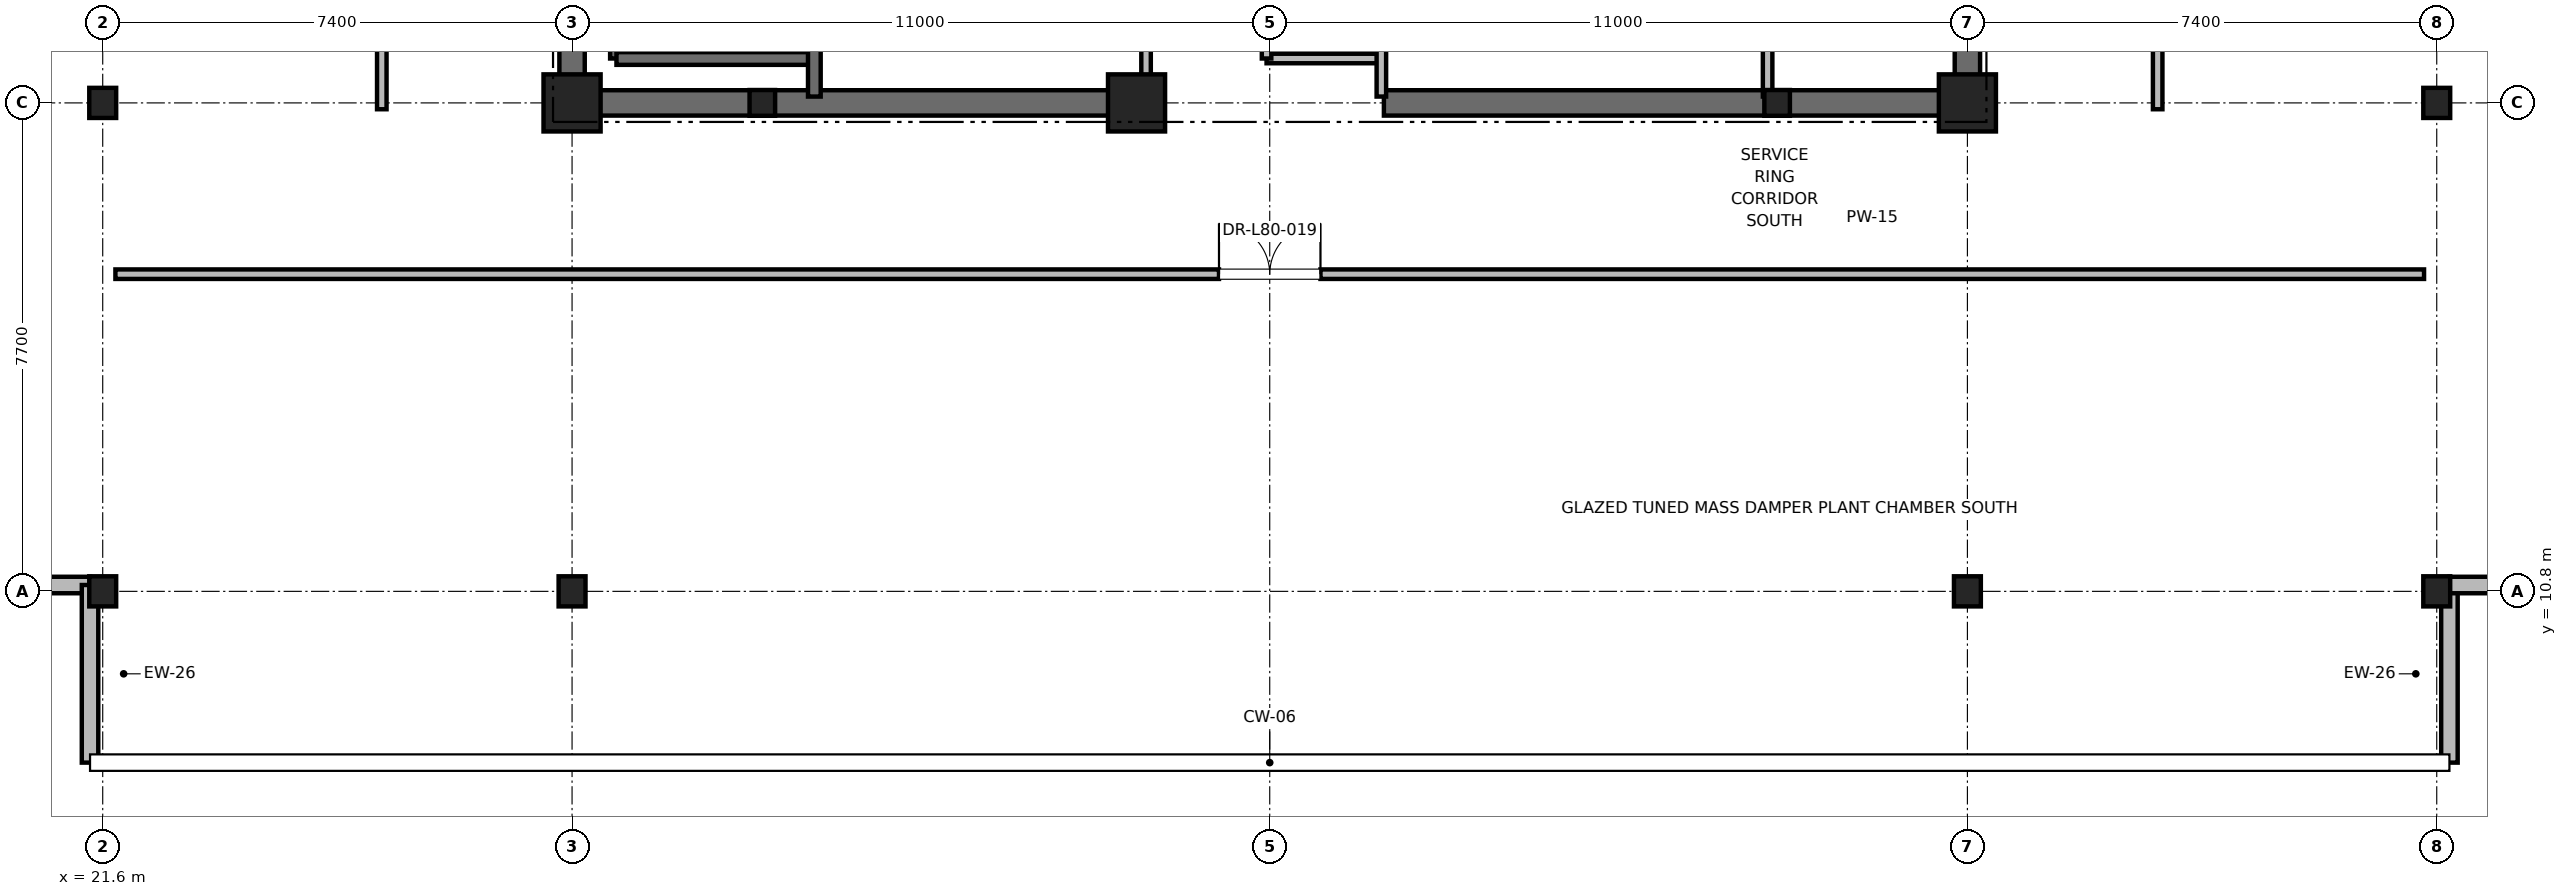
"""IFC4 building model, lengths in metres.
Left out: names, types, materials, properties, quantities, classifications, styles, units other than length and angle.
Written with IfcOpenShell. Run it as: python <this file> out.ifc"""

import sys

from ifc_helpers import new_model, si_unit, direction, frame, frame_2d, origin, origin_2d, place, context, subcontext, project, spatial, rectangle, i_section, extrude, element, fill, save


model = new_model("IFC4")
c1 = context("Model", 3, precision=1e-05, world=origin(), true_north=direction((0.0, 1.0)))
c2 = subcontext(c1, "Body", "Model", "MODEL_VIEW")
j1 = project(units=[si_unit("LENGTHUNIT", "METRE"), si_unit("PLANEANGLEUNIT", "RADIAN")], contexts=[c1])
p1 = place(None, origin())
s1 = spatial("IfcSite", under=j1, at=p1, CompositionType="ELEMENT")
p2 = place(p1, origin())
s2 = spatial("IfcBuilding", under=s1, at=p2, CompositionType="ELEMENT")
p3 = place(p2, frame((0.0, 0.0, 342.8)))
s3 = spatial("IfcBuildingStorey", under=s2, at=p3, CompositionType="ELEMENT", Elevation=342.8)
for number, where, z_axis, x_axis in (
    (1, (29.0, 10.8, 0.0), (0.0, 0.0, 1.0), (1.0, 0.0, 0.0)),
    (2, (51.0, 10.8, 0.0), (0.0, 0.0, 1.0), (1.0, 0.0, 0.0)),
    (3, (21.6, 18.5, 0.0), (0.0, 0.0, 1.0), (1.0, 0.0, 0.0)),
    (4, (58.4, 18.5, 0.0), (0.0, 0.0, 1.0), (1.0, 0.0, 0.0)),
    (5, (21.6, 10.8, 0.0), (0.0, 0.0, 1.0), (1.0, 0.0, 0.0)),
    (6, (58.4, 10.8, 0.0), (0.0, 0.0, 1.0), (1.0, 0.0, 0.0)),
):
    element("IfcColumn", number, at=place(p3, frame(where, z_axis=z_axis, x_axis=x_axis)), inside=s3, PredefinedType="COLUMN", context=c2, shape_type="SweptSolid", body=[
        extrude(i_section(OverallWidth=0.424, OverallDepth=0.475, WebThickness=0.048, FlangeThickness=0.077, FilletRadius=0.015, at=origin_2d()), origin(), (0.0, 0.0, 1.0), 6.0),
    ])
for number, where, z_axis, x_axis in (
    (7, (29.0, 18.5, 0.0), (0.0, 0.0, 1.0), (1.0, 0.0, 0.0)),
    (8, (51.0, 18.5, 0.0), (0.0, 0.0, 1.0), (1.0, 0.0, 0.0)),
    (9, (37.9, 18.5, 0.0), (0.0, 0.0, 1.0), (1.0, 0.0, 0.0)),
):
    element("IfcColumn", number, at=place(p3, frame(where, z_axis=z_axis, x_axis=x_axis)), inside=s3, PredefinedType="PILASTER", context=c2, shape_type="SweptSolid", body=[
        extrude(rectangle(XDim=0.9, YDim=0.9, at=origin_2d()), origin(), (0.0, 0.0, 1.0), 6.0),
    ])
for number, where, z_axis, x_axis in (
    (10, (32.0, 18.5, 0.0), (0.0, 0.0, 1.0), (1.0, 0.0, 0.0)),
    (11, (48.0, 18.5, 0.0), (0.0, 0.0, 1.0), (1.0, 0.0, 0.0)),
):
    element("IfcColumn", number, at=place(p3, frame(where, z_axis=z_axis, x_axis=x_axis)), inside=s3, PredefinedType="COLUMN", context=c2, shape_type="SweptSolid", body=[
        extrude(i_section(OverallWidth=0.403, OverallDepth=0.406, WebThickness=0.027, FlangeThickness=0.043, FilletRadius=0.015, at=origin_2d()), origin(), (0.0, 0.0, 1.0), 6.0),
    ])
for number, where, z_axis, x_axis in (
    (12, (29.0, 18.5, 0.0), (0.0, 0.0, 1.0), (1.0, 0.0, 0.0)),
    (13, (41.8, 18.5, 0.0), (0.0, 0.0, 1.0), (1.0, 0.0, 0.0)),
):
    element("IfcWall", number, at=place(p3, frame(where, z_axis=z_axis, x_axis=x_axis)), inside=s3, PredefinedType="SHEAR", context=c2, shape_type="SweptSolid", body=[
        extrude(rectangle(XDim=9.2, YDim=0.4, at=frame_2d((4.6, 0.0))), origin(), (0.0, 0.0, 1.0), 5.7),
    ])
p4 = place(p3, frame((29.0, 18.5, 0.0), z_axis=(0.0, 0.0, 1.0), x_axis=(0.0, 1.0, 0.0)))
e14 = element("IfcWall", 14, at=p4, inside=s3, PredefinedType="SHEAR", context=c2, shape_type="SweptSolid", body=[
    extrude(rectangle(XDim=8.8, YDim=0.4, at=frame_2d((4.4, 0.0))), origin(), (0.0, 0.0, 1.0), 5.7),
])
p5 = place(p3, frame((51.0, 18.5, 0.0), z_axis=(0.0, 0.0, 1.0), x_axis=(0.0, 1.0, 0.0)))
e15 = element("IfcWall", 15, at=p5, inside=s3, PredefinedType="SHEAR", context=c2, shape_type="SweptSolid", body=[
    extrude(rectangle(XDim=5.8, YDim=0.4, at=frame_2d((2.9, 0.0))), origin(), (0.0, 0.0, 1.0), 5.7),
])
p6 = place(p3, frame((18.2, 10.9, 0.0), z_axis=(0.0, 0.0, 1.0), x_axis=(1.0, 0.0, 0.0)))
e16 = element("IfcWall", 16, at=p6, inside=s3, PredefinedType="PARAPET", context=c2, shape_type="SweptSolid", body=[
    extrude(rectangle(XDim=3.2, YDim=0.26, at=frame_2d((1.6, 0.0))), origin(), (0.0, 0.0, 1.0), 4.753),
])
p7 = place(p6, frame((0.7, 0.0, 0.85)))
e17 = element("IfcOpeningElement", 17, at=p7, cuts=e16, PredefinedType="OPENING", context=c2, shape_type="SweptSolid", body=[
    extrude(rectangle(XDim=1.8, YDim=2.2, at=frame_2d((0.9, 1.1))), frame((0.0, 0.13, 0.0), z_axis=(0.0, -1.0, 0.0), x_axis=(1.0, 0.0, 0.0)), (0.0, 0.0, 1.0), 0.26),
])
for number, where, z_axis, x_axis in (
    (18, (21.4, 10.9, 0.0), (0.0, 0.0, 1.0), (0.0, -1.0, 0.0)),
    (19, (58.6, 8.1, 0.0), (0.0, 0.0, 1.0), (0.0, 1.0, 0.0)),
):
    element("IfcWall", number, at=place(p3, frame(where, z_axis=z_axis, x_axis=x_axis)), inside=s3, PredefinedType="PARAPET", context=c2, shape_type="SweptSolid", body=[
        extrude(rectangle(XDim=2.8, YDim=0.26, at=frame_2d((1.4, 0.0))), origin(), (0.0, 0.0, 1.0), 4.753),
    ])
p8 = place(p3, frame((58.6, 10.9, 0.0), z_axis=(0.0, 0.0, 1.0), x_axis=(1.0, 0.0, 0.0)))
e20 = element("IfcWall", 20, at=p8, inside=s3, PredefinedType="PARAPET", context=c2, shape_type="SweptSolid", body=[
    extrude(rectangle(XDim=3.2, YDim=0.26, at=frame_2d((1.6, 0.0))), origin(), (0.0, 0.0, 1.0), 4.753),
])
p9 = place(p3, frame((29.7, 19.2, 0.0), z_axis=(0.0, 0.0, 1.0), x_axis=(0.0, 1.0, 0.0)))
e21 = element("IfcWall", 21, at=p9, inside=s3, PredefinedType="SOLIDWALL", context=c2, shape_type="SweptSolid", body=[
    extrude(rectangle(XDim=8.15, YDim=0.2, at=frame_2d((4.075, 0.0))), origin(), (0.0, 0.0, 1.0), 5.7),
])
p10 = place(p3, frame((29.7, 19.2, 0.0), z_axis=(0.0, 0.0, 1.0), x_axis=(1.0, 0.0, 0.0)))
e22 = element("IfcWall", 22, at=p10, inside=s3, PredefinedType="SOLIDWALL", context=c2, shape_type="SweptSolid", body=[
    extrude(rectangle(XDim=3.12, YDim=0.2, at=frame_2d((1.56, 0.0))), origin(), (0.0, 0.0, 1.0), 5.7),
])
p11 = place(p3, frame((32.82, 18.6, 0.0), z_axis=(0.0, 0.0, 1.0), x_axis=(0.0, 1.0, 0.0)))
e23 = element("IfcWall", 23, at=p11, inside=s3, PredefinedType="SOLIDWALL", context=c2, shape_type="SweptSolid", body=[
    extrude(rectangle(XDim=8.78, YDim=0.2, at=frame_2d((4.39, 0.0))), origin(), (0.0, 0.0, 1.0), 5.7),
])
p12 = place(p3, frame((39.95, 19.2, 0.0), z_axis=(0.0, 0.0, 1.0), x_axis=(1.0, 0.0, 0.0)))
e24 = element("IfcWall", 24, at=p12, inside=s3, PredefinedType="PARTITIONING", context=c2, shape_type="SweptSolid", body=[
    extrude(rectangle(XDim=1.81, YDim=0.15, at=frame_2d((0.905, 0.0))), origin(), (0.0, 0.0, 1.0), 2.85),
])
p13 = place(p3, frame((41.76, 18.6, 0.0), z_axis=(0.0, 0.0, 1.0), x_axis=(0.0, 1.0, 0.0)))
e25 = element("IfcWall", 25, at=p13, inside=s3, PredefinedType="PARTITIONING", context=c2, shape_type="SweptSolid", body=[
    extrude(rectangle(XDim=3.6, YDim=0.15, at=frame_2d((1.8, 0.0))), origin(), (0.0, 0.0, 1.0), 2.85),
])
p14 = place(p3, frame((39.95, 19.2, 0.0), z_axis=(0.0, 0.0, 1.0), x_axis=(0.0, 1.0, 0.0)))
e26 = element("IfcWall", 26, at=p14, inside=s3, PredefinedType="PARTITIONING", context=c2, shape_type="SweptSolid", body=[
    extrude(rectangle(XDim=3.0, YDim=0.15, at=frame_2d((1.5, 0.0))), origin(), (0.0, 0.0, 1.0), 2.85),
])
p15 = place(p14, frame((1.05, 0.0, 0.0)))
e27 = element("IfcOpeningElement", 27, at=p15, cuts=e26, PredefinedType="OPENING", context=c2, shape_type="SweptSolid", body=[
    extrude(rectangle(XDim=0.9, YDim=2.1, at=frame_2d((0.45, 1.05))), frame((0.0, 0.075, 0.0), z_axis=(0.0, -1.0, 0.0), x_axis=(1.0, 0.0, 0.0)), (0.0, 0.0, 1.0), 0.15),
])
p16 = place(p3, frame((38.05, 18.6, 0.0), z_axis=(0.0, 0.0, 1.0), x_axis=(0.0, 1.0, 0.0)))
e28 = element("IfcWall", 28, at=p16, inside=s3, PredefinedType="PARTITIONING", context=c2, shape_type="SweptSolid", body=[
    extrude(rectangle(XDim=4.46, YDim=0.15, at=frame_2d((2.23, 0.0))), origin(), (0.0, 0.0, 1.0), 2.85),
])
p17 = place(p16, frame((1.79, 0.0, 0.0)))
e29 = element("IfcOpeningElement", 29, at=p17, cuts=e28, PredefinedType="OPENING", context=c2, shape_type="SweptSolid", body=[
    extrude(rectangle(XDim=0.88, YDim=2.1, at=frame_2d((0.44, 1.05))), frame((0.0, 0.075, 0.0), z_axis=(0.0, -1.0, 0.0), x_axis=(1.0, 0.0, 0.0)), (0.0, 0.0, 1.0), 0.15),
])
p18 = place(p3, frame((47.85, 18.6, 0.0), z_axis=(0.0, 0.0, 1.0), x_axis=(0.0, 1.0, 0.0)))
e30 = element("IfcWall", 30, at=p18, inside=s3, PredefinedType="PARTITIONING", context=c2, shape_type="SweptSolid", body=[
    extrude(rectangle(XDim=2.54, YDim=0.15, at=frame_2d((1.27, 0.0))), origin(), (0.0, 0.0, 1.0), 2.85),
])
p19 = place(p3, frame((21.8, 15.8, 0.0), z_axis=(0.0, 0.0, 1.0), x_axis=(1.0, 0.0, 0.0)))
e31 = element("IfcWall", 31, at=p19, inside=s3, PredefinedType="PARTITIONING", context=c2, shape_type="SweptSolid", body=[
    extrude(rectangle(XDim=36.4, YDim=0.15, at=frame_2d((18.2, 0.0))), origin(), (0.0, 0.0, 1.0), 2.85),
])
p20 = place(p19, frame((17.4, 0.0, 0.0)))
e32 = element("IfcOpeningElement", 32, at=p20, cuts=e31, PredefinedType="OPENING", context=c2, shape_type="SweptSolid", body=[
    extrude(rectangle(XDim=1.6, YDim=2.25, at=frame_2d((0.8, 1.125))), frame((0.0, 0.075, 0.0), z_axis=(0.0, -1.0, 0.0), x_axis=(1.0, 0.0, 0.0)), (0.0, 0.0, 1.0), 0.15),
])
p21 = place(p3, frame((26.0, 18.4, 0.0), z_axis=(0.0, 0.0, 1.0), x_axis=(0.0, 1.0, 0.0)))
e33 = element("IfcWall", 33, at=p21, inside=s3, PredefinedType="PARTITIONING", context=c2, shape_type="SweptSolid", body=[
    extrude(rectangle(XDim=18.2, YDim=0.15, at=frame_2d((9.1, 0.0))), origin(), (0.0, 0.0, 1.0), 2.85),
])
p22 = place(p21, frame((8.3, 0.0, 0.0)))
e34 = element("IfcOpeningElement", 34, at=p22, cuts=e33, PredefinedType="OPENING", context=c2, shape_type="SweptSolid", body=[
    extrude(rectangle(XDim=1.6, YDim=2.25, at=frame_2d((0.8, 1.125))), frame((0.0, 0.075, 0.0), z_axis=(0.0, -1.0, 0.0), x_axis=(1.0, 0.0, 0.0)), (0.0, 0.0, 1.0), 0.15),
])
p23 = place(p3, frame((54.0, 18.4, 0.0), z_axis=(0.0, 0.0, 1.0), x_axis=(0.0, 1.0, 0.0)))
e35 = element("IfcWall", 35, at=p23, inside=s3, PredefinedType="PARTITIONING", context=c2, shape_type="SweptSolid", body=[
    extrude(rectangle(XDim=18.2, YDim=0.15, at=frame_2d((9.1, 0.0))), origin(), (0.0, 0.0, 1.0), 2.85),
])
p24 = place(p23, frame((8.3, 0.0, 0.0)))
e36 = element("IfcOpeningElement", 36, at=p24, cuts=e35, PredefinedType="OPENING", context=c2, shape_type="SweptSolid", body=[
    extrude(rectangle(XDim=1.6, YDim=2.25, at=frame_2d((0.8, 1.125))), frame((0.0, 0.075, 0.0), z_axis=(0.0, -1.0, 0.0), x_axis=(1.0, 0.0, 0.0)), (0.0, 0.0, 1.0), 0.15),
])
p25 = place(p20, origin())
e37 = element("IfcDoor", 37, at=p25, inside=s3, OperationType="DOUBLE_DOOR_SINGLE_SWING", PredefinedType="DOOR", context=c2, shape_type="SweptSolid", body=[
    extrude(rectangle(XDim=1.6, YDim=2.25, at=frame_2d((0.8, 1.125))), frame((0.0, 0.025, 0.0), z_axis=(0.0, -1.0, 0.0), x_axis=(1.0, 0.0, 0.0)), (0.0, 0.0, 1.0), 0.05),
])
fill(e32, e37)
save(model, sys.argv[1])
